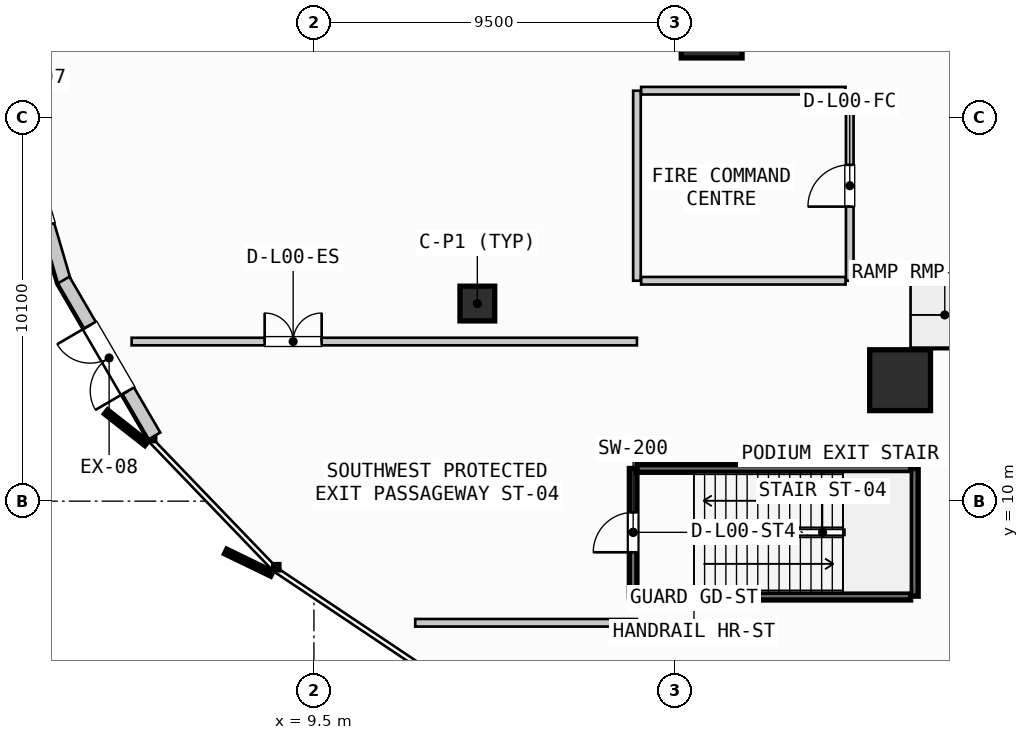
"""IFC4 building model, lengths in metres.
Left out: names, types, materials, properties, quantities, classifications, styles, units other than length and angle.
Written with IfcOpenShell. Run it as: python <this file> out.ifc"""

import sys

from ifc_helpers import new_model, si_unit, direction, frame, frame_2d, origin, origin_2d, place, context, subcontext, project, spatial, rectangle, hollow_rectangle, hollow_circle, extrude, source, transform, mapped, element, fill, save


model = new_model("IFC4")
c1 = context("Model", 3, precision=1e-05, world=origin(), true_north=direction((0.0, 1.0)))
c2 = subcontext(c1, "Body", "Model", "MODEL_VIEW")
j1 = project(units=[si_unit("LENGTHUNIT", "METRE"), si_unit("PLANEANGLEUNIT", "RADIAN")], contexts=[c1])
p1 = place(None, origin())
s1 = spatial("IfcSite", under=j1, at=p1, CompositionType="ELEMENT")
p2 = place(p1, origin())
s2 = spatial("IfcBuilding", under=s1, at=p2, CompositionType="ELEMENT")
p3 = place(p2, origin())
s3 = spatial("IfcBuildingStorey", under=s2, at=p3, CompositionType="ELEMENT", Elevation=0.0)
m1 = source(origin(), c2, "Body", "SweptSolid", [
    extrude(hollow_rectangle(XDim=1.6, YDim=1.6, WallThickness=0.06, InnerFilletRadius=0.03, OuterFilletRadius=0.09, at=origin_2d()), origin(), (0.0, 0.0, 1.0), 4.95),
])
for number, where, z_axis, x_axis in (
    (1, (19.966, 22.462, 0.0), (0.0, 0.0, 1.0), (1.0, 0.0, 0.0)),
    (2, (24.925, 13.183, 0.0), (0.0, 0.0, 1.0), (1.0, 0.0, 0.0)),
):
    element("IfcColumn", number, at=place(p3, frame(where, z_axis=z_axis, x_axis=x_axis)), inside=s3, PredefinedType="COLUMN", context=c2, shape_type="MappedRepresentation", body=[
        mapped(m1, transform((0.0, 0.0, 0.0), scale=1.0)),
    ])
m2 = source(origin(), c2, "Body", "SweptSolid", [
    extrude(hollow_circle(Radius=0.457, WallThickness=0.032, at=origin_2d()), origin(), (0.0, 0.0, 1.0), 4.95),
])
p4 = place(p3, frame((13.8, 15.2, 0.0), z_axis=(0.0, 0.0, 1.0), x_axis=(1.0, 0.0, 0.0)))
e3 = element("IfcColumn", 3, at=p4, inside=s3, PredefinedType="COLUMN", context=c2, shape_type="MappedRepresentation", body=[
    mapped(m2, transform((0.0, 0.0, 0.0), scale=1.0)),
])
p5 = place(p3, frame((2.936, 15.77, 0.0), z_axis=(0.0, 0.0, 1.0), x_axis=(-0.281735210535, 0.959492194416, 0.0)))
e4 = element("IfcWall", 4, at=p5, inside=s3, PredefinedType="SOLIDWALL", context=c2, shape_type="SweptSolid", body=[
    extrude(rectangle(XDim=5.121, YDim=0.35, at=frame_2d((2.56, 0.0))), origin(), (0.0, 0.0, 1.0), 4.95),
])
p6 = place(p5, frame((1.56, 0.0, 0.0)))
e5 = element("IfcOpeningElement", 5, at=p6, cuts=e4, PredefinedType="OPENING", context=c2, shape_type="SweptSolid", body=[
    extrude(rectangle(XDim=2.0, YDim=2.4, at=frame_2d((1.0, 1.2))), frame((0.0, 0.185, 0.0), z_axis=(0.0, -1.0, 0.0), x_axis=(1.0, 0.0, 0.0)), (0.0, 0.0, 1.0), 0.37),
])
p7 = place(p3, frame((5.306, 11.717, 0.0), z_axis=(0.0, 0.0, 1.0), x_axis=(-0.503519292696, 0.863983982423, 0.0)))
e6 = element("IfcWall", 6, at=p7, inside=s3, PredefinedType="SOLIDWALL", context=c2, shape_type="SweptSolid", body=[
    extrude(rectangle(XDim=4.748, YDim=0.35, at=frame_2d((2.374, 0.0))), origin(), (0.0, 0.0, 1.0), 4.95),
])
p8 = place(p7, frame((1.374, 0.0, 0.0)))
e7 = element("IfcOpeningElement", 7, at=p8, cuts=e6, PredefinedType="OPENING", context=c2, shape_type="SweptSolid", body=[
    extrude(rectangle(XDim=2.0, YDim=2.4, at=frame_2d((1.0, 1.2))), frame((0.0, 0.185, 0.0), z_axis=(0.0, -1.0, 0.0), x_axis=(1.0, 0.0, 0.0)), (0.0, 0.0, 1.0), 0.37),
])
p9 = place(p3, frame((17.9, 7.5, 0.0), z_axis=(0.0, 0.0, 1.0), x_axis=(0.0, 1.0, 0.0)))
e8 = element("IfcWall", 8, at=p9, inside=s3, PredefinedType="SHEAR", context=c2, shape_type="SweptSolid", body=[
    extrude(rectangle(XDim=3.36, YDim=0.2, at=frame_2d((1.68, 0.0))), origin(), (0.0, 0.0, 1.0), 4.95),
])
p10 = place(p9, frame((1.155, 0.0, 0.0)))
e9 = element("IfcOpeningElement", 9, at=p10, cuts=e8, PredefinedType="OPENING", context=c2, shape_type="SweptSolid", body=[
    extrude(rectangle(XDim=1.05, YDim=2.15, at=frame_2d((0.525, 1.075))), frame((0.0, 0.11, 0.0), z_axis=(0.0, -1.0, 0.0), x_axis=(1.0, 0.0, 0.0)), (0.0, 0.0, 1.0), 0.22),
])
p11 = place(p3, frame((25.3, 10.86, 0.0), z_axis=(0.0, 0.0, 1.0), x_axis=(0.0, -1.0, 0.0)))
e10 = element("IfcWall", 10, at=p11, inside=s3, PredefinedType="SHEAR", context=c2, shape_type="SweptSolid", body=[
    extrude(rectangle(XDim=3.36, YDim=0.2, at=frame_2d((1.68, 0.0))), origin(), (0.0, 0.0, 1.0), 4.95),
])
for number, where, z_axis, x_axis in (
    (11, (25.2, 7.5, 0.0), (0.0, 0.0, 1.0), (-1.0, 0.0, 0.0)),
    (12, (18.0, 10.86, 0.0), (0.0, 0.0, 1.0), (1.0, 0.0, 0.0)),
):
    element("IfcWall", number, at=place(p3, frame(where, z_axis=z_axis, x_axis=x_axis)), inside=s3, PredefinedType="SHEAR", context=c2, shape_type="SweptSolid", body=[
        extrude(rectangle(XDim=7.2, YDim=0.2, at=frame_2d((3.6, 0.0))), origin(), (0.0, 0.0, 1.0), 4.95),
    ])
p12 = place(p3, frame((23.6, 15.8, 0.0), z_axis=(0.0, 0.0, 1.0), x_axis=(0.0, 1.0, 0.0)))
e13 = element("IfcWall", 13, at=p12, inside=s3, PredefinedType="PARTITIONING", context=c2, shape_type="SweptSolid", body=[
    extrude(rectangle(XDim=5.0, YDim=0.2, at=frame_2d((2.5, 0.0))), origin(), (0.0, 0.0, 1.0), 4.163),
])
p13 = place(p12, frame((1.95, 0.0, 0.0)))
e14 = element("IfcOpeningElement", 14, at=p13, cuts=e13, PredefinedType="OPENING", context=c2, shape_type="SweptSolid", body=[
    extrude(rectangle(XDim=1.1, YDim=2.15, at=frame_2d((0.55, 1.075))), frame((0.0, 0.11, 0.0), z_axis=(0.0, -1.0, 0.0), x_axis=(1.0, 0.0, 0.0)), (0.0, 0.0, 1.0), 0.22),
])
p14 = place(p3, frame((18.0, 15.8, 0.0), z_axis=(0.0, 0.0, 1.0), x_axis=(0.0, 1.0, 0.0)))
e15 = element("IfcWall", 15, at=p14, inside=s3, PredefinedType="PARTITIONING", context=c2, shape_type="SweptSolid", body=[
    extrude(rectangle(XDim=5.0, YDim=0.2, at=frame_2d((2.5, 0.0))), origin(), (0.0, 0.0, 1.0), 4.163),
])
for number, where, z_axis, x_axis in (
    (16, (18.11, 15.8, 0.0), (0.0, 0.0, 1.0), (1.0, 0.0, 0.0)),
    (17, (18.11, 20.8, 0.0), (0.0, 0.0, 1.0), (1.0, 0.0, 0.0)),
):
    element("IfcWall", number, at=place(p3, frame(where, z_axis=z_axis, x_axis=x_axis)), inside=s3, PredefinedType="PARTITIONING", context=c2, shape_type="SweptSolid", body=[
        extrude(rectangle(XDim=5.38, YDim=0.2, at=frame_2d((2.69, 0.0))), origin(), (0.0, 0.0, 1.0), 4.163),
    ])
p15 = place(p3, frame((4.704, 14.2, 0.0), z_axis=(0.0, 0.0, 1.0), x_axis=(1.0, 0.0, 0.0)))
e18 = element("IfcWall", 18, at=p15, inside=s3, PredefinedType="PARTITIONING", context=c2, shape_type="SweptSolid", body=[
    extrude(rectangle(XDim=13.296, YDim=0.2, at=frame_2d((6.648, 0.0))), origin(), (0.0, 0.0, 1.0), 4.163),
])
p16 = place(p15, frame((3.5, 0.0, 0.0)))
e19 = element("IfcOpeningElement", 19, at=p16, cuts=e18, PredefinedType="OPENING", context=c2, shape_type="SweptSolid", body=[
    extrude(rectangle(XDim=1.5, YDim=2.2, at=frame_2d((0.75, 1.1))), frame((0.0, 0.11, 0.0), z_axis=(0.0, -1.0, 0.0), x_axis=(1.0, 0.0, 0.0)), (0.0, 0.0, 1.0), 0.22),
])
p17 = place(p3, frame((12.165, 6.8, 0.0), z_axis=(0.0, 0.0, 1.0), x_axis=(1.0, 0.0, 0.0)))
e20 = element("IfcWall", 20, at=p17, inside=s3, PredefinedType="PARTITIONING", context=c2, shape_type="SweptSolid", body=[
    extrude(rectangle(XDim=5.835, YDim=0.2, at=frame_2d((2.917, 0.0))), origin(), (0.0, 0.0, 1.0), 4.163),
])
m3 = source(origin(), c2, "Body", "SweptSolid", [
    extrude(rectangle(XDim=2.0, YDim=2.4, at=frame_2d((1.0, 1.2))), frame((0.0, 0.025, 0.0), z_axis=(0.0, -1.0, 0.0), x_axis=(1.0, 0.0, 0.0)), (0.0, 0.0, 1.0), 0.05),
])
p18 = place(p8, origin())
e21 = element("IfcDoor", 21, at=p18, inside=s3, OperationType="DOUBLE_DOOR_SINGLE_SWING", PredefinedType="DOOR", context=c2, shape_type="MappedRepresentation", body=[
    mapped(m3, transform((0.0, 0.0, 0.0), scale=1.0)),
])
fill(e7, e21)
m4 = source(origin(), c2, "Body", "SweptSolid", [
    extrude(rectangle(XDim=1.05, YDim=2.15, at=frame_2d((0.525, 1.075))), frame((0.0, 0.025, 0.0), z_axis=(0.0, -1.0, 0.0), x_axis=(1.0, 0.0, 0.0)), (0.0, 0.0, 1.0), 0.05),
])
p19 = place(p10, origin())
e22 = element("IfcDoor", 22, at=p19, inside=s3, OperationType="SINGLE_SWING_LEFT", PredefinedType="DOOR", context=c2, shape_type="MappedRepresentation", body=[
    mapped(m4, transform((0.0, 0.0, 0.0), scale=1.0)),
])
fill(e9, e22)
m5 = source(origin(), c2, "Body", "SweptSolid", [
    extrude(rectangle(XDim=1.1, YDim=2.15, at=frame_2d((0.55, 1.075))), frame((0.0, 0.025, 0.0), z_axis=(0.0, -1.0, 0.0), x_axis=(1.0, 0.0, 0.0)), (0.0, 0.0, 1.0), 0.05),
])
p20 = place(p13, origin())
e23 = element("IfcDoor", 23, at=p20, inside=s3, OperationType="SINGLE_SWING_LEFT", PredefinedType="DOOR", context=c2, shape_type="MappedRepresentation", body=[
    mapped(m5, transform((0.0, 0.0, 0.0), scale=1.0)),
])
fill(e14, e23)
m6 = source(origin(), c2, "Body", "SweptSolid", [
    extrude(rectangle(XDim=1.5, YDim=2.2, at=frame_2d((0.75, 1.1))), frame((0.0, 0.025, 0.0), z_axis=(0.0, -1.0, 0.0), x_axis=(1.0, 0.0, 0.0)), (0.0, 0.0, 1.0), 0.05),
])
p21 = place(p16, origin())
e24 = element("IfcDoor", 24, at=p21, inside=s3, OperationType="DOUBLE_DOOR_SINGLE_SWING", PredefinedType="DOOR", context=c2, shape_type="MappedRepresentation", body=[
    mapped(m6, transform((0.0, 0.0, 0.0), scale=1.0)),
])
fill(e19, e24)
save(model, sys.argv[1])
